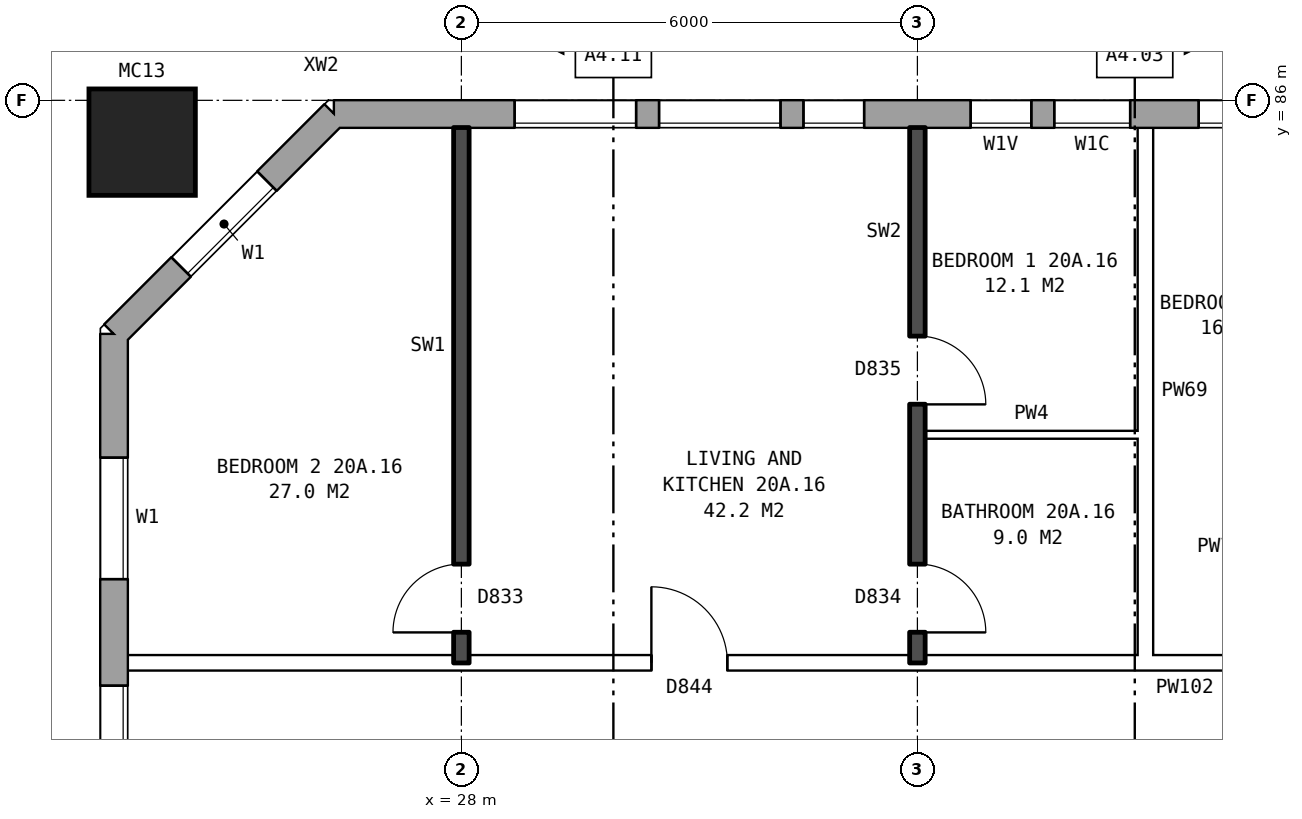
"""IFC4 building model, lengths in metres.
Left out: names, types, materials, properties, quantities, classifications, styles, units other than length and angle.
Written with IfcOpenShell. Run it as: python <this file> out.ifc"""

import sys

from ifc_helpers import new_model, si_unit, direction, frame, frame_2d, origin, origin_2d, place, context, subcontext, project, spatial, rectangle, hollow_rectangle, extrude, element, fill, save


model = new_model("IFC4")
c1 = context("Model", 3, precision=1e-05, world=origin(), true_north=direction((0.0, 1.0)))
c2 = subcontext(c1, "Body", "Model", "MODEL_VIEW")
j1 = project(units=[si_unit("LENGTHUNIT", "METRE"), si_unit("PLANEANGLEUNIT", "RADIAN")], contexts=[c1])
p1 = place(None, origin())
s1 = spatial("IfcSite", under=j1, at=p1, CompositionType="ELEMENT")
p2 = place(p1, origin())
s2 = spatial("IfcBuilding", under=s1, at=p2, CompositionType="ELEMENT")
p3 = place(p2, frame((0.0, 0.0, 74.7)))
s3 = spatial("IfcBuildingStorey", under=s2, at=p3, CompositionType="ELEMENT", Elevation=74.7)
p4 = place(p3, frame((23.8, 85.45, 0.0), z_axis=(0.0, 0.0, 1.0), x_axis=(1.0, 0.0, 0.0)))
e1 = element("IfcColumn", 1, at=p4, inside=s3, PredefinedType="COLUMN", context=c2, shape_type="SweptSolid", body=[
    extrude(hollow_rectangle(XDim=1.4, YDim=1.4, WallThickness=0.075, at=origin_2d()), origin(), (0.0, 0.0, 1.0), 3.1),
])
p5 = place(p3, frame((72.925, 85.82, 0.0), z_axis=(0.0, 0.0, 1.0), x_axis=(-1.0, 0.0, 0.0)))
e2 = element("IfcWall", 2, at=p5, inside=s3, PredefinedType="STANDARD", context=c2, shape_type="SweptSolid", body=[
    extrude(rectangle(XDim=46.601, YDim=0.36, at=frame_2d((23.3, 0.0))), origin(), (0.0, 0.0, 1.0), 2.85),
])
p6 = place(p5, frame((0.625, 0.0, 0.8)))
e3 = element("IfcOpeningElement", 3, at=p6, cuts=e2, PredefinedType="OPENING", context=c2, shape_type="SweptSolid", body=[
    extrude(rectangle(XDim=1.6, YDim=1.8, at=frame_2d((0.8, 0.9))), frame((0.0, 0.19, 0.0), z_axis=(0.0, -1.0, 0.0), x_axis=(1.0, 0.0, 0.0)), (0.0, 0.0, 1.0), 0.38),
])
p7 = place(p5, frame((3.625, 0.0, 0.8)))
e4 = element("IfcOpeningElement", 4, at=p7, cuts=e2, PredefinedType="OPENING", context=c2, shape_type="SweptSolid", body=[
    extrude(rectangle(XDim=1.6, YDim=1.8, at=frame_2d((0.8, 0.9))), frame((0.0, 0.19, 0.0), z_axis=(0.0, -1.0, 0.0), x_axis=(1.0, 0.0, 0.0)), (0.0, 0.0, 1.0), 0.38),
])
p8 = place(p5, frame((5.525, 0.0, 1.7)))
e5 = element("IfcOpeningElement", 5, at=p8, cuts=e2, PredefinedType="OPENING", context=c2, shape_type="SweptSolid", body=[
    extrude(rectangle(XDim=1.4, YDim=0.9, at=frame_2d((0.7, 0.45))), frame((0.0, 0.19, 0.0), z_axis=(0.0, -1.0, 0.0), x_axis=(1.0, 0.0, 0.0)), (0.0, 0.0, 1.0), 0.38),
])
p9 = place(p5, frame((9.625, 0.0, 0.8)))
e6 = element("IfcOpeningElement", 6, at=p9, cuts=e2, PredefinedType="OPENING", context=c2, shape_type="SweptSolid", body=[
    extrude(rectangle(XDim=1.6, YDim=1.8, at=frame_2d((0.8, 0.9))), frame((0.0, 0.19, 0.0), z_axis=(0.0, -1.0, 0.0), x_axis=(1.0, 0.0, 0.0)), (0.0, 0.0, 1.0), 0.38),
])
p10 = place(p5, frame((12.625, 0.0, 0.8)))
e7 = element("IfcOpeningElement", 7, at=p10, cuts=e2, PredefinedType="OPENING", context=c2, shape_type="SweptSolid", body=[
    extrude(rectangle(XDim=1.6, YDim=1.8, at=frame_2d((0.8, 0.9))), frame((0.0, 0.19, 0.0), z_axis=(0.0, -1.0, 0.0), x_axis=(1.0, 0.0, 0.0)), (0.0, 0.0, 1.0), 0.38),
])
p11 = place(p5, frame((15.625, 0.0, 0.8)))
e8 = element("IfcOpeningElement", 8, at=p11, cuts=e2, PredefinedType="OPENING", context=c2, shape_type="SweptSolid", body=[
    extrude(rectangle(XDim=1.6, YDim=1.8, at=frame_2d((0.8, 0.9))), frame((0.0, 0.19, 0.0), z_axis=(0.0, -1.0, 0.0), x_axis=(1.0, 0.0, 0.0)), (0.0, 0.0, 1.0), 0.38),
])
p12 = place(p5, frame((18.625, 0.0, 0.8)))
e9 = element("IfcOpeningElement", 9, at=p12, cuts=e2, PredefinedType="OPENING", context=c2, shape_type="SweptSolid", body=[
    extrude(rectangle(XDim=1.6, YDim=1.8, at=frame_2d((0.8, 0.9))), frame((0.0, 0.19, 0.0), z_axis=(0.0, -1.0, 0.0), x_axis=(1.0, 0.0, 0.0)), (0.0, 0.0, 1.0), 0.38),
])
p13 = place(p5, frame((21.625, 0.0, 0.8)))
e10 = element("IfcOpeningElement", 10, at=p13, cuts=e2, PredefinedType="OPENING", context=c2, shape_type="SweptSolid", body=[
    extrude(rectangle(XDim=1.6, YDim=1.8, at=frame_2d((0.8, 0.9))), frame((0.0, 0.19, 0.0), z_axis=(0.0, -1.0, 0.0), x_axis=(1.0, 0.0, 0.0)), (0.0, 0.0, 1.0), 0.38),
])
p14 = place(p5, frame((24.625, 0.0, 0.8)))
e11 = element("IfcOpeningElement", 11, at=p14, cuts=e2, PredefinedType="OPENING", context=c2, shape_type="SweptSolid", body=[
    extrude(rectangle(XDim=1.6, YDim=1.8, at=frame_2d((0.8, 0.9))), frame((0.0, 0.19, 0.0), z_axis=(0.0, -1.0, 0.0), x_axis=(1.0, 0.0, 0.0)), (0.0, 0.0, 1.0), 0.38),
])
p15 = place(p5, frame((27.625, 0.0, 0.8)))
e12 = element("IfcOpeningElement", 12, at=p15, cuts=e2, PredefinedType="OPENING", context=c2, shape_type="SweptSolid", body=[
    extrude(rectangle(XDim=1.6, YDim=1.8, at=frame_2d((0.8, 0.9))), frame((0.0, 0.19, 0.0), z_axis=(0.0, -1.0, 0.0), x_axis=(1.0, 0.0, 0.0)), (0.0, 0.0, 1.0), 0.38),
])
p16 = place(p5, frame((30.625, 0.0, 0.8)))
e13 = element("IfcOpeningElement", 13, at=p16, cuts=e2, PredefinedType="OPENING", context=c2, shape_type="SweptSolid", body=[
    extrude(rectangle(XDim=1.6, YDim=1.8, at=frame_2d((0.8, 0.9))), frame((0.0, 0.19, 0.0), z_axis=(0.0, -1.0, 0.0), x_axis=(1.0, 0.0, 0.0)), (0.0, 0.0, 1.0), 0.38),
])
p17 = place(p5, frame((33.625, 0.0, 0.8)))
e14 = element("IfcOpeningElement", 14, at=p17, cuts=e2, PredefinedType="OPENING", context=c2, shape_type="SweptSolid", body=[
    extrude(rectangle(XDim=1.6, YDim=1.8, at=frame_2d((0.8, 0.9))), frame((0.0, 0.19, 0.0), z_axis=(0.0, -1.0, 0.0), x_axis=(1.0, 0.0, 0.0)), (0.0, 0.0, 1.0), 0.38),
])
p18 = place(p5, frame((36.125, 0.0, 0.8)))
e15 = element("IfcOpeningElement", 15, at=p18, cuts=e2, PredefinedType="OPENING", context=c2, shape_type="SweptSolid", body=[
    extrude(rectangle(XDim=1.0, YDim=1.8, at=frame_2d((0.5, 0.9))), frame((0.0, 0.19, 0.0), z_axis=(0.0, -1.0, 0.0), x_axis=(1.0, 0.0, 0.0)), (0.0, 0.0, 1.0), 0.38),
])
p19 = place(p5, frame((39.625, 0.0, 1.7)))
e16 = element("IfcOpeningElement", 16, at=p19, cuts=e2, PredefinedType="OPENING", context=c2, shape_type="SweptSolid", body=[
    extrude(rectangle(XDim=0.8, YDim=0.9, at=frame_2d((0.4, 0.45))), frame((0.0, 0.19, 0.0), z_axis=(0.0, -1.0, 0.0), x_axis=(1.0, 0.0, 0.0)), (0.0, 0.0, 1.0), 0.38),
])
p20 = place(p5, frame((42.625, 0.0, 0.8)))
e17 = element("IfcOpeningElement", 17, at=p20, cuts=e2, PredefinedType="OPENING", context=c2, shape_type="SweptSolid", body=[
    extrude(rectangle(XDim=1.6, YDim=1.8, at=frame_2d((0.8, 0.9))), frame((0.0, 0.19, 0.0), z_axis=(0.0, -1.0, 0.0), x_axis=(1.0, 0.0, 0.0)), (0.0, 0.0, 1.0), 0.38),
])
p21 = place(p5, frame((37.425, 0.0, 0.8)))
e18 = element("IfcOpeningElement", 18, at=p21, cuts=e2, PredefinedType="OPENING", context=c2, shape_type="SweptSolid", body=[
    extrude(rectangle(XDim=0.8, YDim=0.9, at=frame_2d((0.4, 0.45))), frame((0.0, 0.19, 0.0), z_axis=(0.0, -1.0, 0.0), x_axis=(1.0, 0.0, 0.0)), (0.0, 0.0, 1.0), 0.38),
])
p22 = place(p5, frame((40.725, 0.0, 0.8)))
e19 = element("IfcOpeningElement", 19, at=p22, cuts=e2, PredefinedType="OPENING", context=c2, shape_type="SweptSolid", body=[
    extrude(rectangle(XDim=1.6, YDim=1.8, at=frame_2d((0.8, 0.9))), frame((0.0, 0.19, 0.0), z_axis=(0.0, -1.0, 0.0), x_axis=(1.0, 0.0, 0.0)), (0.0, 0.0, 1.0), 0.38),
])
p23 = place(p3, frame((26.325, 85.82, 0.0), z_axis=(0.0, 0.0, 1.0), x_axis=(-0.707106781187, -0.707106781187, 0.0)))
e20 = element("IfcWall", 20, at=p23, inside=s3, PredefinedType="STANDARD", context=c2, shape_type="SweptSolid", body=[
    extrude(rectangle(XDim=4.094, YDim=0.36, at=frame_2d((2.047, 0.0))), origin(), (0.0, 0.0, 1.0), 2.85),
])
p24 = place(p23, frame((1.247, 0.0, 0.8)))
e21 = element("IfcOpeningElement", 21, at=p24, cuts=e20, PredefinedType="OPENING", context=c2, shape_type="SweptSolid", body=[
    extrude(rectangle(XDim=1.6, YDim=1.8, at=frame_2d((0.8, 0.9))), frame((0.0, 0.19, 0.0), z_axis=(0.0, -1.0, 0.0), x_axis=(1.0, 0.0, 0.0)), (0.0, 0.0, 1.0), 0.38),
])
p25 = place(p3, frame((23.43, 82.925, 0.0), z_axis=(0.0, 0.0, 1.0), x_axis=(0.0, -1.0, 0.0)))
e22 = element("IfcWall", 22, at=p25, inside=s3, PredefinedType="STANDARD", context=c2, shape_type="SweptSolid", body=[
    extrude(rectangle(XDim=25.851, YDim=0.36, at=frame_2d((12.925, 0.0))), origin(), (0.0, 0.0, 1.0), 2.85),
])
p26 = place(p25, frame((1.625, 0.0, 0.8)))
e23 = element("IfcOpeningElement", 23, at=p26, cuts=e22, PredefinedType="OPENING", context=c2, shape_type="SweptSolid", body=[
    extrude(rectangle(XDim=1.6, YDim=1.8, at=frame_2d((0.8, 0.9))), frame((0.0, 0.19, 0.0), z_axis=(0.0, -1.0, 0.0), x_axis=(1.0, 0.0, 0.0)), (0.0, 0.0, 1.0), 0.38),
])
p27 = place(p25, frame((4.625, 0.0, 0.8)))
e24 = element("IfcOpeningElement", 24, at=p27, cuts=e22, PredefinedType="OPENING", context=c2, shape_type="SweptSolid", body=[
    extrude(rectangle(XDim=1.6, YDim=1.8, at=frame_2d((0.8, 0.9))), frame((0.0, 0.19, 0.0), z_axis=(0.0, -1.0, 0.0), x_axis=(1.0, 0.0, 0.0)), (0.0, 0.0, 1.0), 0.38),
])
p28 = place(p25, frame((6.525, 0.0, 0.8)))
e25 = element("IfcOpeningElement", 25, at=p28, cuts=e22, PredefinedType="OPENING", context=c2, shape_type="SweptSolid", body=[
    extrude(rectangle(XDim=1.2, YDim=1.8, at=frame_2d((0.6, 0.9))), frame((0.0, 0.19, 0.0), z_axis=(0.0, -1.0, 0.0), x_axis=(1.0, 0.0, 0.0)), (0.0, 0.0, 1.0), 0.38),
])
p29 = place(p25, frame((8.025, 0.0, 1.7)))
e26 = element("IfcOpeningElement", 26, at=p29, cuts=e22, PredefinedType="OPENING", context=c2, shape_type="SweptSolid", body=[
    extrude(rectangle(XDim=1.0, YDim=0.9, at=frame_2d((0.5, 0.45))), frame((0.0, 0.19, 0.0), z_axis=(0.0, -1.0, 0.0), x_axis=(1.0, 0.0, 0.0)), (0.0, 0.0, 1.0), 0.38),
])
p30 = place(p25, frame((10.125, 0.0, 0.8)))
e27 = element("IfcOpeningElement", 27, at=p30, cuts=e22, PredefinedType="OPENING", context=c2, shape_type="SweptSolid", body=[
    extrude(rectangle(XDim=0.8, YDim=0.9, at=frame_2d((0.4, 0.45))), frame((0.0, 0.19, 0.0), z_axis=(0.0, -1.0, 0.0), x_axis=(1.0, 0.0, 0.0)), (0.0, 0.0, 1.0), 0.38),
])
p31 = place(p25, frame((11.375, 0.0, 0.8)))
e28 = element("IfcOpeningElement", 28, at=p31, cuts=e22, PredefinedType="OPENING", context=c2, shape_type="SweptSolid", body=[
    extrude(rectangle(XDim=1.2, YDim=1.8, at=frame_2d((0.6, 0.9))), frame((0.0, 0.19, 0.0), z_axis=(0.0, -1.0, 0.0), x_axis=(1.0, 0.0, 0.0)), (0.0, 0.0, 1.0), 0.38),
])
p32 = place(p25, frame((19.625, 0.0, 0.8)))
e29 = element("IfcOpeningElement", 29, at=p32, cuts=e22, PredefinedType="OPENING", context=c2, shape_type="SweptSolid", body=[
    extrude(rectangle(XDim=1.6, YDim=1.8, at=frame_2d((0.8, 0.9))), frame((0.0, 0.19, 0.0), z_axis=(0.0, -1.0, 0.0), x_axis=(1.0, 0.0, 0.0)), (0.0, 0.0, 1.0), 0.38),
])
p33 = place(p25, frame((22.625, 0.0, 0.8)))
e30 = element("IfcOpeningElement", 30, at=p33, cuts=e22, PredefinedType="OPENING", context=c2, shape_type="SweptSolid", body=[
    extrude(rectangle(XDim=1.6, YDim=1.8, at=frame_2d((0.8, 0.9))), frame((0.0, 0.19, 0.0), z_axis=(0.0, -1.0, 0.0), x_axis=(1.0, 0.0, 0.0)), (0.0, 0.0, 1.0), 0.38),
])
p34 = place(p25, frame((12.875, 0.0, 0.8)))
e31 = element("IfcOpeningElement", 31, at=p34, cuts=e22, PredefinedType="OPENING", context=c2, shape_type="SweptSolid", body=[
    extrude(rectangle(XDim=1.6, YDim=1.8, at=frame_2d((0.8, 0.9))), frame((0.0, 0.19, 0.0), z_axis=(0.0, -1.0, 0.0), x_axis=(1.0, 0.0, 0.0)), (0.0, 0.0, 1.0), 0.38),
])
p35 = place(p25, frame((14.775, 0.0, 0.8)))
e32 = element("IfcOpeningElement", 32, at=p35, cuts=e22, PredefinedType="OPENING", context=c2, shape_type="SweptSolid", body=[
    extrude(rectangle(XDim=0.8, YDim=0.9, at=frame_2d((0.4, 0.45))), frame((0.0, 0.19, 0.0), z_axis=(0.0, -1.0, 0.0), x_axis=(1.0, 0.0, 0.0)), (0.0, 0.0, 1.0), 0.38),
])
p36 = place(p25, frame((16.725, 0.0, 1.7)))
e33 = element("IfcOpeningElement", 33, at=p36, cuts=e22, PredefinedType="OPENING", context=c2, shape_type="SweptSolid", body=[
    extrude(rectangle(XDim=1.0, YDim=0.9, at=frame_2d((0.5, 0.45))), frame((0.0, 0.19, 0.0), z_axis=(0.0, -1.0, 0.0), x_axis=(1.0, 0.0, 0.0)), (0.0, 0.0, 1.0), 0.38),
])
p37 = place(p25, frame((18.025, 0.0, 0.8)))
e34 = element("IfcOpeningElement", 34, at=p37, cuts=e22, PredefinedType="OPENING", context=c2, shape_type="SweptSolid", body=[
    extrude(rectangle(XDim=1.2, YDim=1.8, at=frame_2d((0.6, 0.9))), frame((0.0, 0.19, 0.0), z_axis=(0.0, -1.0, 0.0), x_axis=(1.0, 0.0, 0.0)), (0.0, 0.0, 1.0), 0.38),
])
p38 = place(p3, frame((23.61, 78.6, 0.0), z_axis=(0.0, 0.0, 1.0), x_axis=(1.0, 0.0, 0.0)))
e35 = element("IfcWall", 35, at=p38, inside=s3, PredefinedType="PARTITIONING", context=c2, shape_type="SweptSolid", body=[
    extrude(rectangle(XDim=22.29, YDim=0.2, at=frame_2d((11.145, 0.0))), origin(), (0.0, 0.0, 1.0), 2.85),
])
p39 = place(p38, frame((18.84, 0.0, 0.0)))
e36 = element("IfcOpeningElement", 36, at=p39, cuts=e35, PredefinedType="OPENING", context=c2, shape_type="SweptSolid", body=[
    extrude(rectangle(XDim=1.0, YDim=2.1, at=frame_2d((0.5, 1.05))), frame((0.0, 0.11, 0.0), z_axis=(0.0, -1.0, 0.0), x_axis=(1.0, 0.0, 0.0)), (0.0, 0.0, 1.0), 0.22),
])
p40 = place(p38, frame((6.89, 0.0, 0.0)))
e37 = element("IfcOpeningElement", 37, at=p40, cuts=e35, PredefinedType="OPENING", context=c2, shape_type="SweptSolid", body=[
    extrude(rectangle(XDim=1.0, YDim=2.1, at=frame_2d((0.5, 1.05))), frame((0.0, 0.11, 0.0), z_axis=(0.0, -1.0, 0.0), x_axis=(1.0, 0.0, 0.0)), (0.0, 0.0, 1.0), 0.22),
])
p41 = place(p3, frame((34.1, 81.6, 0.0), z_axis=(0.0, 0.0, 1.0), x_axis=(1.0, 0.0, 0.0)))
e38 = element("IfcWall", 38, at=p41, inside=s3, PredefinedType="PARTITIONING", context=c2, shape_type="SweptSolid", body=[
    extrude(rectangle(XDim=2.8, YDim=0.1, at=frame_2d((1.4, 0.0))), origin(), (0.0, 0.0, 1.0), 2.85),
])
p42 = place(p3, frame((28.0, 78.6, 0.0), z_axis=(0.0, 0.0, 1.0), x_axis=(0.0, 1.0, 0.0)))
e39 = element("IfcWall", 39, at=p42, inside=s3, PredefinedType="SOLIDWALL", context=c2, shape_type="SweptSolid", body=[
    extrude(rectangle(XDim=7.04, YDim=0.2, at=frame_2d((3.52, 0.0))), origin(), (0.0, 0.0, 1.0), 2.85),
])
p43 = place(p42, frame((0.4, 0.0, 0.0)))
e40 = element("IfcOpeningElement", 40, at=p43, cuts=e39, PredefinedType="OPENING", context=c2, shape_type="SweptSolid", body=[
    extrude(rectangle(XDim=0.9, YDim=2.1, at=frame_2d((0.45, 1.05))), frame((0.0, 0.11, 0.0), z_axis=(0.0, -1.0, 0.0), x_axis=(1.0, 0.0, 0.0)), (0.0, 0.0, 1.0), 0.22),
])
p44 = place(p3, frame((34.0, 78.6, 0.0), z_axis=(0.0, 0.0, 1.0), x_axis=(0.0, 1.0, 0.0)))
e41 = element("IfcWall", 41, at=p44, inside=s3, PredefinedType="SOLIDWALL", context=c2, shape_type="SweptSolid", body=[
    extrude(rectangle(XDim=7.04, YDim=0.2, at=frame_2d((3.52, 0.0))), origin(), (0.0, 0.0, 1.0), 2.85),
])
p45 = place(p44, frame((3.4, 0.0, 0.0)))
e42 = element("IfcOpeningElement", 42, at=p45, cuts=e41, PredefinedType="OPENING", context=c2, shape_type="SweptSolid", body=[
    extrude(rectangle(XDim=0.9, YDim=2.1, at=frame_2d((0.45, 1.05))), frame((0.0, 0.11, 0.0), z_axis=(0.0, -1.0, 0.0), x_axis=(1.0, 0.0, 0.0)), (0.0, 0.0, 1.0), 0.22),
])
p46 = place(p44, frame((0.4, 0.0, 0.0)))
e43 = element("IfcOpeningElement", 43, at=p46, cuts=e41, PredefinedType="OPENING", context=c2, shape_type="SweptSolid", body=[
    extrude(rectangle(XDim=0.9, YDim=2.1, at=frame_2d((0.45, 1.05))), frame((0.0, 0.11, 0.0), z_axis=(0.0, -1.0, 0.0), x_axis=(1.0, 0.0, 0.0)), (0.0, 0.0, 1.0), 0.22),
])
p47 = place(p3, frame((37.0, 78.7, 0.0), z_axis=(0.0, 0.0, 1.0), x_axis=(0.0, 1.0, 0.0)))
e44 = element("IfcWall", 44, at=p47, inside=s3, PredefinedType="PARTITIONING", context=c2, shape_type="SweptSolid", body=[
    extrude(rectangle(XDim=6.94, YDim=0.2, at=frame_2d((3.47, 0.0))), origin(), (0.0, 0.0, 1.0), 2.85),
])
p48 = place(p17, origin())
e45 = element("IfcWindow", 45, at=p48, inside=s3, PartitioningType="SINGLE_PANEL", PredefinedType="WINDOW", context=c2, shape_type="SweptSolid", body=[
    extrude(rectangle(XDim=1.6, YDim=1.8, at=frame_2d((0.8, 0.9))), frame((0.0, 0.15, 0.0), z_axis=(0.0, -1.0, 0.0), x_axis=(1.0, 0.0, 0.0)), (0.0, 0.0, 1.0), 0.06),
])
fill(e14, e45)
p49 = place(p18, origin())
e46 = element("IfcWindow", 46, at=p49, inside=s3, PartitioningType="SINGLE_PANEL", PredefinedType="WINDOW", context=c2, shape_type="SweptSolid", body=[
    extrude(rectangle(XDim=1.0, YDim=1.8, at=frame_2d((0.5, 0.9))), frame((0.0, 0.15, 0.0), z_axis=(0.0, -1.0, 0.0), x_axis=(1.0, 0.0, 0.0)), (0.0, 0.0, 1.0), 0.06),
])
fill(e15, e46)
p50 = place(p19, origin())
e47 = element("IfcWindow", 47, at=p50, inside=s3, PartitioningType="SINGLE_PANEL", PredefinedType="WINDOW", context=c2, shape_type="SweptSolid", body=[
    extrude(rectangle(XDim=0.8, YDim=0.9, at=frame_2d((0.4, 0.45))), frame((0.0, 0.15, 0.0), z_axis=(0.0, -1.0, 0.0), x_axis=(1.0, 0.0, 0.0)), (0.0, 0.0, 1.0), 0.06),
])
fill(e16, e47)
p51 = place(p20, origin())
e48 = element("IfcWindow", 48, at=p51, inside=s3, PartitioningType="SINGLE_PANEL", PredefinedType="WINDOW", context=c2, shape_type="SweptSolid", body=[
    extrude(rectangle(XDim=1.6, YDim=1.8, at=frame_2d((0.8, 0.9))), frame((0.0, 0.15, 0.0), z_axis=(0.0, -1.0, 0.0), x_axis=(1.0, 0.0, 0.0)), (0.0, 0.0, 1.0), 0.06),
])
fill(e17, e48)
p52 = place(p24, origin())
e49 = element("IfcWindow", 49, at=p52, inside=s3, PartitioningType="SINGLE_PANEL", PredefinedType="WINDOW", context=c2, shape_type="SweptSolid", body=[
    extrude(rectangle(XDim=1.6, YDim=1.8, at=frame_2d((0.8, 0.9))), frame((0.0, 0.15, 0.0), z_axis=(0.0, -1.0, 0.0), x_axis=(1.0, 0.0, 0.0)), (0.0, 0.0, 1.0), 0.06),
])
fill(e21, e49)
p53 = place(p26, origin())
e50 = element("IfcWindow", 50, at=p53, inside=s3, PartitioningType="SINGLE_PANEL", PredefinedType="WINDOW", context=c2, shape_type="SweptSolid", body=[
    extrude(rectangle(XDim=1.6, YDim=1.8, at=frame_2d((0.8, 0.9))), frame((0.0, 0.15, 0.0), z_axis=(0.0, -1.0, 0.0), x_axis=(1.0, 0.0, 0.0)), (0.0, 0.0, 1.0), 0.06),
])
fill(e23, e50)
p54 = place(p27, origin())
e51 = element("IfcWindow", 51, at=p54, inside=s3, PartitioningType="SINGLE_PANEL", PredefinedType="WINDOW", context=c2, shape_type="SweptSolid", body=[
    extrude(rectangle(XDim=1.6, YDim=1.8, at=frame_2d((0.8, 0.9))), frame((0.0, 0.15, 0.0), z_axis=(0.0, -1.0, 0.0), x_axis=(1.0, 0.0, 0.0)), (0.0, 0.0, 1.0), 0.06),
])
fill(e24, e51)
p55 = place(p45, frame((0.9, 0.0, 0.0), z_axis=(0.0, 0.0, 1.0), x_axis=(-1.0, 0.0, 0.0)))
e52 = element("IfcDoor", 52, at=p55, inside=s3, OperationType="SINGLE_SWING_RIGHT", PredefinedType="DOOR", context=c2, shape_type="SweptSolid", body=[
    extrude(rectangle(XDim=0.9, YDim=2.1, at=frame_2d((0.45, 1.05))), frame((0.0, 0.025, 0.0), z_axis=(0.0, -1.0, 0.0), x_axis=(1.0, 0.0, 0.0)), (0.0, 0.0, 1.0), 0.05),
])
fill(e42, e52)
p56 = place(p43, origin())
e53 = element("IfcDoor", 53, at=p56, inside=s3, OperationType="SINGLE_SWING_LEFT", PredefinedType="DOOR", context=c2, shape_type="SweptSolid", body=[
    extrude(rectangle(XDim=0.9, YDim=2.1, at=frame_2d((0.45, 1.05))), frame((0.0, 0.025, 0.0), z_axis=(0.0, -1.0, 0.0), x_axis=(1.0, 0.0, 0.0)), (0.0, 0.0, 1.0), 0.05),
])
fill(e40, e53)
p57 = place(p40, origin())
e54 = element("IfcDoor", 54, at=p57, inside=s3, OperationType="SINGLE_SWING_LEFT", PredefinedType="DOOR", context=c2, shape_type="SweptSolid", body=[
    extrude(rectangle(XDim=1.0, YDim=2.1, at=frame_2d((0.5, 1.05))), frame((0.0, 0.025, 0.0), z_axis=(0.0, -1.0, 0.0), x_axis=(1.0, 0.0, 0.0)), (0.0, 0.0, 1.0), 0.05),
])
fill(e37, e54)
p58 = place(p46, frame((0.9, 0.0, 0.0), z_axis=(0.0, 0.0, 1.0), x_axis=(-1.0, 0.0, 0.0)))
e55 = element("IfcDoor", 55, at=p58, inside=s3, OperationType="SINGLE_SWING_RIGHT", PredefinedType="DOOR", context=c2, shape_type="SweptSolid", body=[
    extrude(rectangle(XDim=0.9, YDim=2.1, at=frame_2d((0.45, 1.05))), frame((0.0, 0.025, 0.0), z_axis=(0.0, -1.0, 0.0), x_axis=(1.0, 0.0, 0.0)), (0.0, 0.0, 1.0), 0.05),
])
fill(e43, e55)
p59 = place(p21, origin())
e56 = element("IfcWindow", 56, at=p59, inside=s3, PartitioningType="SINGLE_PANEL", PredefinedType="WINDOW", context=c2, shape_type="SweptSolid", body=[
    extrude(rectangle(XDim=0.8, YDim=0.9, at=frame_2d((0.4, 0.45))), frame((0.0, 0.15, 0.0), z_axis=(0.0, -1.0, 0.0), x_axis=(1.0, 0.0, 0.0)), (0.0, 0.0, 1.0), 0.06),
])
fill(e18, e56)
p60 = place(p22, origin())
e57 = element("IfcWindow", 57, at=p60, inside=s3, PartitioningType="SINGLE_PANEL", PredefinedType="WINDOW", context=c2, shape_type="SweptSolid", body=[
    extrude(rectangle(XDim=1.6, YDim=1.8, at=frame_2d((0.8, 0.9))), frame((0.0, 0.15, 0.0), z_axis=(0.0, -1.0, 0.0), x_axis=(1.0, 0.0, 0.0)), (0.0, 0.0, 1.0), 0.06),
])
fill(e19, e57)
save(model, sys.argv[1])
